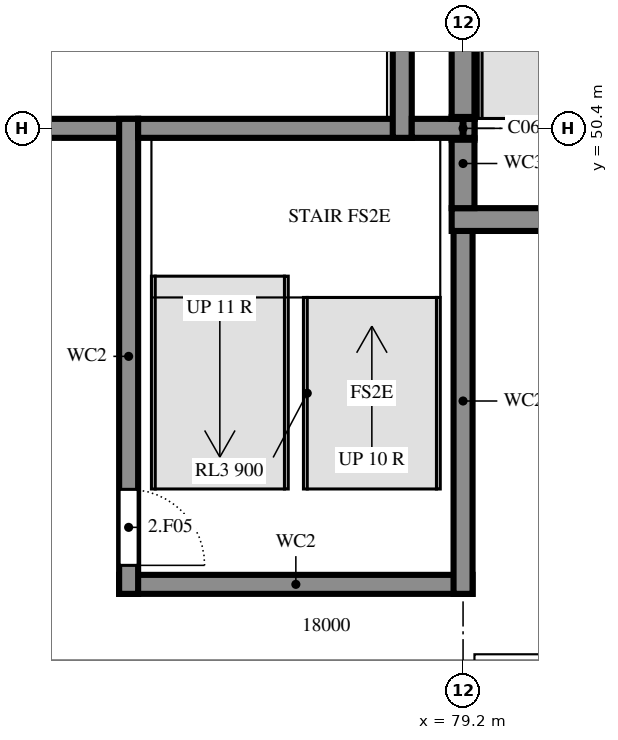
"""IFC4 building model, lengths in metres.
Left out: names, types, materials, properties, quantities, classifications, styles, units other than length and angle.
Written with IfcOpenShell. Run it as: python <this file> out.ifc"""

import sys

from ifc_helpers import new_model, si_unit, direction, frame, frame_2d, origin, origin_2d, place, context, subcontext, project, spatial, rectangle, i_section, extrude, element, fill, save


model = new_model("IFC4")
c1 = context("Model", 3, precision=1e-05, world=origin(), true_north=direction((0.0, 1.0)))
c2 = subcontext(c1, "Body", "Model", "MODEL_VIEW")
j1 = project(units=[si_unit("LENGTHUNIT", "METRE"), si_unit("PLANEANGLEUNIT", "RADIAN")], contexts=[c1])
p1 = place(None, origin())
s1 = spatial("IfcSite", under=j1, at=p1, CompositionType="ELEMENT")
p2 = place(p1, origin())
s2 = spatial("IfcBuilding", under=s1, at=p2, CompositionType="ELEMENT")
p3 = place(p2, frame((0.0, 0.0, 7.2)))
s3 = spatial("IfcBuildingStorey", under=s2, at=p3, CompositionType="ELEMENT", Elevation=7.2)
p4 = place(p3, frame((79.2, 50.4, 0.0), z_axis=(0.0, 0.0, 1.0), x_axis=(1.0, 0.0, 0.0)))
e1 = element("IfcColumn", 1, at=p4, inside=s3, PredefinedType="COLUMN", context=c2, shape_type="SweptSolid", body=[
    extrude(i_section(OverallWidth=0.3, OverallDepth=0.3, WebThickness=0.011, FlangeThickness=0.019, FilletRadius=0.027, at=origin_2d()), origin(), (0.0, 0.0, 1.0), 3.6),
])
p5 = place(p3, frame((74.675, 44.4, 0.0), z_axis=(0.0, 0.0, 1.0), x_axis=(1.0, 0.0, 0.0)))
e2 = element("IfcWall", 2, at=p5, inside=s3, PredefinedType="SHEAR", context=c2, shape_type="SweptSolid", body=[
    extrude(rectangle(XDim=4.65, YDim=0.25, at=frame_2d((2.325, 0.0))), origin(), (0.0, 0.0, 1.0), 3.6),
])
p6 = place(p3, frame((79.2, 44.275, 0.0), z_axis=(0.0, 0.0, 1.0), x_axis=(0.0, 1.0, 0.0)))
e3 = element("IfcWall", 3, at=p6, inside=s3, PredefinedType="SHEAR", context=c2, shape_type="SweptSolid", body=[
    extrude(rectangle(XDim=5.075, YDim=0.25, at=frame_2d((2.538, 0.0))), origin(), (0.0, 0.0, 1.0), 3.6),
])
p7 = place(p3, frame((79.05, 49.2, 0.0), z_axis=(0.0, 0.0, 1.0), x_axis=(1.0, 0.0, 0.0)))
e4 = element("IfcWall", 4, at=p7, inside=s3, PredefinedType="SHEAR", context=c2, shape_type="SweptSolid", body=[
    extrude(rectangle(XDim=5.3, YDim=0.3, at=frame_2d((2.65, 0.0))), origin(), (0.0, 0.0, 1.0), 3.6),
])
p8 = place(p7, frame((2.1, 0.0, 0.0)))
e5 = element("IfcOpeningElement", 5, at=p8, cuts=e4, PredefinedType="OPENING", context=c2, shape_type="SweptSolid", body=[
    extrude(rectangle(XDim=1.2, YDim=2.4, at=frame_2d((0.6, 1.2))), frame((0.0, 0.16, 0.0), z_axis=(0.0, -1.0, 0.0), x_axis=(1.0, 0.0, 0.0)), (0.0, 0.0, 1.0), 0.32),
])
p9 = place(p3, frame((79.2, 49.35, 0.0), z_axis=(0.0, 0.0, 1.0), x_axis=(0.0, 1.0, 0.0)))
e6 = element("IfcWall", 6, at=p9, inside=s3, PredefinedType="SHEAR", context=c2, shape_type="SweptSolid", body=[
    extrude(rectangle(XDim=1.175, YDim=0.3, at=frame_2d((0.587, 0.0))), origin(), (0.0, 0.0, 1.0), 3.6),
])
p10 = place(p3, frame((73.525, 50.4, 0.0), z_axis=(0.0, 0.0, 1.0), x_axis=(1.0, 0.0, 0.0)))
e7 = element("IfcWall", 7, at=p10, inside=s3, PredefinedType="SHEAR", context=c2, shape_type="SweptSolid", body=[
    extrude(rectangle(XDim=1.4, YDim=0.25, at=frame_2d((0.7, 0.0))), origin(), (0.0, 0.0, 1.0), 3.6),
])
p11 = place(p3, frame((74.8, 50.525, 0.0), z_axis=(0.0, 0.0, 1.0), x_axis=(0.0, -1.0, 0.0)))
e8 = element("IfcWall", 8, at=p11, inside=s3, PredefinedType="SHEAR", context=c2, shape_type="SweptSolid", body=[
    extrude(rectangle(XDim=6.25, YDim=0.25, at=frame_2d((3.125, 0.0))), origin(), (0.0, 0.0, 1.0), 3.6),
])
p12 = place(p11, frame((4.875, 0.0, 0.0)))
e9 = element("IfcOpeningElement", 9, at=p12, cuts=e8, PredefinedType="OPENING", context=c2, shape_type="SweptSolid", body=[
    extrude(rectangle(XDim=1.0, YDim=2.4, at=frame_2d((0.5, 1.2))), frame((0.0, 0.135, 0.0), z_axis=(0.0, -1.0, 0.0), x_axis=(1.0, 0.0, 0.0)), (0.0, 0.0, 1.0), 0.27),
])
p13 = place(p3, frame((78.525, 50.4, 0.0), z_axis=(0.0, 0.0, 1.0), x_axis=(-1.0, 0.0, 0.0)))
e10 = element("IfcWall", 10, at=p13, inside=s3, PredefinedType="SHEAR", context=c2, shape_type="SweptSolid", body=[
    extrude(rectangle(XDim=3.6, YDim=0.25, at=frame_2d((1.8, 0.0))), origin(), (0.0, 0.0, 1.0), 3.6),
])
p14 = place(p3, frame((78.4, 50.275, 0.0), z_axis=(0.0, 0.0, 1.0), x_axis=(0.0, 1.0, 0.0)))
e11 = element("IfcWall", 11, at=p14, inside=s3, PredefinedType="SHEAR", context=c2, shape_type="SweptSolid", body=[
    extrude(rectangle(XDim=6.75, YDim=0.25, at=frame_2d((3.375, 0.0))), origin(), (0.0, 0.0, 1.0), 3.6),
])
p15 = place(p14, frame((5.575, 0.0, 0.0)))
e12 = element("IfcOpeningElement", 12, at=p15, cuts=e11, PredefinedType="OPENING", context=c2, shape_type="SweptSolid", body=[
    extrude(rectangle(XDim=0.9, YDim=2.1, at=frame_2d((0.45, 1.05))), frame((0.0, 0.135, 0.0), z_axis=(0.0, -1.0, 0.0), x_axis=(1.0, 0.0, 0.0)), (0.0, 0.0, 1.0), 0.27),
])
p16 = place(p3, frame((79.35, 50.4, 0.0), z_axis=(0.0, 0.0, 1.0), x_axis=(-1.0, 0.0, 0.0)))
e13 = element("IfcWall", 13, at=p16, inside=s3, PredefinedType="SHEAR", context=c2, shape_type="SweptSolid", body=[
    extrude(rectangle(XDim=0.825, YDim=0.25, at=frame_2d((0.413, 0.0))), origin(), (0.0, 0.0, 1.0), 3.6),
])
p17 = place(p3, frame((79.2, 55.85, 0.0), z_axis=(0.0, 0.0, 1.0), x_axis=(0.0, -1.0, 0.0)))
e14 = element("IfcWall", 14, at=p17, inside=s3, PredefinedType="SHEAR", context=c2, shape_type="SweptSolid", body=[
    extrude(rectangle(XDim=5.325, YDim=0.3, at=frame_2d((2.663, 0.0))), origin(), (0.0, 0.0, 1.0), 3.6),
])
p18 = place(p3, frame((79.35, 43.2, 0.0), z_axis=(0.0, 0.0, 1.0), x_axis=(1.0, 0.0, 0.0)))
e15 = element("IfcWall", 15, at=p18, inside=s3, PredefinedType="SOLIDWALL", context=c2, shape_type="SweptSolid", body=[
    extrude(rectangle(XDim=6.9, YDim=0.56, at=frame_2d((3.45, 0.0))), origin(), (0.0, 0.0, 1.0), 3.12),
])
p19 = place(p12, origin())
e16 = element("IfcDoor", 16, at=p19, inside=s3, OperationType="SINGLE_SWING_LEFT", PredefinedType="DOOR", context=c2, shape_type="SweptSolid", body=[
    extrude(rectangle(XDim=1.0, YDim=2.4, at=frame_2d((0.5, 1.2))), frame((0.0, 0.025, 0.0), z_axis=(0.0, -1.0, 0.0), x_axis=(1.0, 0.0, 0.0)), (0.0, 0.0, 1.0), 0.05),
])
fill(e9, e16)
save(model, sys.argv[1])
